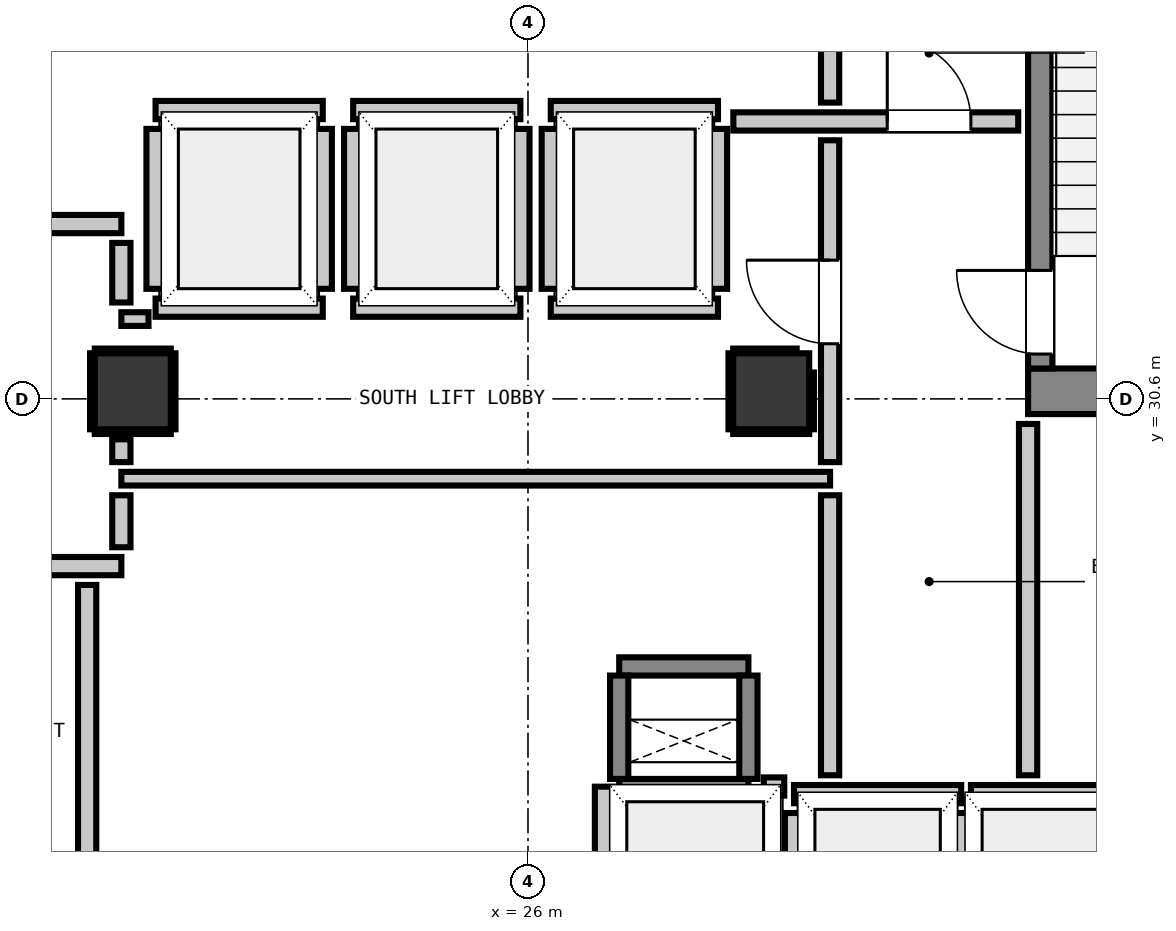
"""IFC4 building model, lengths in metres.
Left out: names, types, materials, properties, quantities, classifications, styles, units other than length and angle.
Written with IfcOpenShell. Run it as: python <this file> out.ifc"""

import sys

from ifc_helpers import new_model, si_unit, direction, frame, frame_2d, origin, origin_2d, place, context, subcontext, project, spatial, rectangle, extrude, element, fill, save


model = new_model("IFC4")
c1 = context("Model", 3, precision=1e-05, world=origin(), true_north=direction((0.0, 1.0)))
c2 = subcontext(c1, "Body", "Model", "MODEL_VIEW")
j1 = project(units=[si_unit("LENGTHUNIT", "METRE"), si_unit("PLANEANGLEUNIT", "RADIAN")], contexts=[c1])
p1 = place(None, origin())
s1 = spatial("IfcSite", under=j1, at=p1, CompositionType="ELEMENT")
p2 = place(p1, origin())
s2 = spatial("IfcBuilding", under=s1, at=p2, CompositionType="ELEMENT")
p3 = place(p2, frame((0.0, 0.0, 169.16)))
s3 = spatial("IfcBuildingStorey", under=s2, at=p3, CompositionType="ELEMENT", Elevation=169.16)
p4 = place(p3, frame((32.58, 30.7, 0.0), z_axis=(0.0, 0.0, 1.0), x_axis=(1.0, 0.0, 0.0)))
e1 = element("IfcWall", 1, at=p4, inside=s3, PredefinedType="SHEAR", context=c2, shape_type="SweptSolid", body=[
    extrude(rectangle(XDim=3.415, YDim=0.6, at=frame_2d((1.708, 0.0))), origin(), (0.0, 0.0, 1.0), 3.32),
])
p5 = place(p3, frame((32.74, 31.0, 0.0), z_axis=(0.0, 0.0, 1.0), x_axis=(0.0, 1.0, 0.0)))
e2 = element("IfcWall", 2, at=p5, inside=s3, PredefinedType="SHEAR", context=c2, shape_type="SweptSolid", body=[
    extrude(rectangle(XDim=7.8, YDim=0.32, at=frame_2d((3.9, 0.0))), origin(), (0.0, 0.0, 1.0), 3.32),
])
p6 = place(p5, frame((0.19, 0.0, 0.0)))
e3 = element("IfcOpeningElement", 3, at=p6, cuts=e2, PredefinedType="OPENING", context=c2, shape_type="SweptSolid", body=[
    extrude(rectangle(XDim=1.1, YDim=2.15, at=frame_2d((0.55, 1.075))), frame((0.0, 0.17, 0.0), z_axis=(0.0, -1.0, 0.0), x_axis=(1.0, 0.0, 0.0)), (0.0, 0.0, 1.0), 0.34),
])
for number, where, z_axis, x_axis in (
    (4, (27.2, 25.48, 0.0), (0.0, 0.0, 1.0), (1.0, 0.0, 0.0)),
    (5, (27.2, 27.08, 0.0), (0.0, 0.0, 1.0), (1.0, 0.0, 0.0)),
):
    element("IfcWall", number, at=place(p3, frame(where, z_axis=z_axis, x_axis=x_axis)), inside=s3, PredefinedType="SHEAR", context=c2, shape_type="SweptSolid", body=[
        extrude(rectangle(XDim=1.7, YDim=0.24, at=frame_2d((0.85, 0.0))), origin(), (0.0, 0.0, 1.0), 3.32),
    ])
for number, where, z_axis, x_axis in (
    (6, (27.2, 25.6, 0.0), (0.0, 0.0, 1.0), (0.0, 1.0, 0.0)),
    (7, (28.9, 25.6, 0.0), (0.0, 0.0, 1.0), (0.0, 1.0, 0.0)),
):
    element("IfcWall", number, at=place(p3, frame(where, z_axis=z_axis, x_axis=x_axis)), inside=s3, PredefinedType="SHEAR", context=c2, shape_type="SweptSolid", body=[
        extrude(rectangle(XDim=1.36, YDim=0.24, at=frame_2d((0.68, 0.0))), origin(), (0.0, 0.0, 1.0), 3.32),
    ])
for number, where, z_axis, x_axis in (
    (8, (20.8, 30.7, 0.0), (0.0, 0.0, 1.0), (1.0, 0.0, 0.0)),
    (9, (29.2, 30.7, 0.0), (0.0, 0.0, 1.0), (1.0, 0.0, 0.0)),
):
    element("IfcColumn", number, at=place(p3, frame(where, z_axis=z_axis, x_axis=x_axis)), inside=s3, PredefinedType="COLUMN", context=c2, shape_type="SweptSolid", body=[
        extrude(rectangle(XDim=1.0, YDim=1.0, at=origin_2d()), origin(), (0.0, 0.0, 1.0), 3.32),
    ])
for number, where, z_axis, x_axis in (
    (10, (21.1, 31.8, 0.0), (0.0, 0.0, 1.0), (1.0, 0.0, 0.0)),
    (11, (21.1, 34.4, 0.0), (0.0, 0.0, 1.0), (1.0, 0.0, 0.0)),
):
    element("IfcWall", number, at=place(p3, frame(where, z_axis=z_axis, x_axis=x_axis)), inside=s3, PredefinedType="PARTITIONING", context=c2, shape_type="SweptSolid", body=[
        extrude(rectangle(XDim=2.2, YDim=0.24, at=frame_2d((1.1, 0.0))), origin(), (0.0, 0.0, 1.0), 2.96),
    ])
p7 = place(p3, frame((21.1, 32.048, 0.0), z_axis=(0.0, 0.0, 1.0), x_axis=(0.0, 1.0, 0.0)))
e12 = element("IfcWall", 12, at=p7, inside=s3, PredefinedType="PARTITIONING", context=c2, shape_type="SweptSolid", body=[
    extrude(rectangle(XDim=2.104, YDim=0.24, at=frame_2d((1.052, 0.0))), origin(), (0.0, 0.0, 1.0), 2.195),
])
p8 = place(p3, frame((23.3, 32.048, 0.0), z_axis=(0.0, 0.0, 1.0), x_axis=(0.0, 1.0, 0.0)))
e13 = element("IfcWall", 13, at=p8, inside=s3, PredefinedType="PARTITIONING", context=c2, shape_type="SweptSolid", body=[
    extrude(rectangle(XDim=2.104, YDim=0.24, at=frame_2d((1.052, 0.0))), origin(), (0.0, 0.0, 1.0), 2.96),
])
for number, where, z_axis, x_axis in (
    (14, (23.7, 31.8, 0.0), (0.0, 0.0, 1.0), (1.0, 0.0, 0.0)),
    (15, (23.7, 34.4, 0.0), (0.0, 0.0, 1.0), (1.0, 0.0, 0.0)),
):
    element("IfcWall", number, at=place(p3, frame(where, z_axis=z_axis, x_axis=x_axis)), inside=s3, PredefinedType="PARTITIONING", context=c2, shape_type="SweptSolid", body=[
        extrude(rectangle(XDim=2.2, YDim=0.24, at=frame_2d((1.1, 0.0))), origin(), (0.0, 0.0, 1.0), 2.96),
    ])
for number, where, z_axis, x_axis in (
    (16, (23.7, 32.048, 0.0), (0.0, 0.0, 1.0), (0.0, 1.0, 0.0)),
    (17, (25.9, 32.048, 0.0), (0.0, 0.0, 1.0), (0.0, 1.0, 0.0)),
):
    element("IfcWall", number, at=place(p3, frame(where, z_axis=z_axis, x_axis=x_axis)), inside=s3, PredefinedType="PARTITIONING", context=c2, shape_type="SweptSolid", body=[
        extrude(rectangle(XDim=2.104, YDim=0.24, at=frame_2d((1.052, 0.0))), origin(), (0.0, 0.0, 1.0), 2.96),
    ])
for number, where, z_axis, x_axis in (
    (18, (26.3, 31.8, 0.0), (0.0, 0.0, 1.0), (1.0, 0.0, 0.0)),
    (19, (26.3, 34.4, 0.0), (0.0, 0.0, 1.0), (1.0, 0.0, 0.0)),
):
    element("IfcWall", number, at=place(p3, frame(where, z_axis=z_axis, x_axis=x_axis)), inside=s3, PredefinedType="PARTITIONING", context=c2, shape_type="SweptSolid", body=[
        extrude(rectangle(XDim=2.2, YDim=0.24, at=frame_2d((1.1, 0.0))), origin(), (0.0, 0.0, 1.0), 2.96),
    ])
for number, where, z_axis, x_axis in (
    (20, (26.3, 32.048, 0.0), (0.0, 0.0, 1.0), (0.0, 1.0, 0.0)),
    (21, (28.5, 32.048, 0.0), (0.0, 0.0, 1.0), (0.0, 1.0, 0.0)),
):
    element("IfcWall", number, at=place(p3, frame(where, z_axis=z_axis, x_axis=x_axis)), inside=s3, PredefinedType="PARTITIONING", context=c2, shape_type="SweptSolid", body=[
        extrude(rectangle(XDim=2.104, YDim=0.24, at=frame_2d((1.052, 0.0))), origin(), (0.0, 0.0, 1.0), 2.96),
    ])
p9 = place(p3, frame((29.5, 25.4, 0.0), z_axis=(0.0, 0.0, 1.0), x_axis=(1.0, 0.0, 0.0)))
e22 = element("IfcWall", 22, at=p9, inside=s3, PredefinedType="PARTITIONING", context=c2, shape_type="SweptSolid", body=[
    extrude(rectangle(XDim=2.2, YDim=0.24, at=frame_2d((1.1, 0.0))), origin(), (0.0, 0.0, 1.0), 2.96),
])
p10 = place(p3, frame((29.5, 22.632, 0.0), z_axis=(0.0, 0.0, 1.0), x_axis=(0.0, 1.0, 0.0)))
e23 = element("IfcWall", 23, at=p10, inside=s3, PredefinedType="PARTITIONING", context=c2, shape_type="SweptSolid", body=[
    extrude(rectangle(XDim=2.52, YDim=0.24, at=frame_2d((1.26, 0.0))), origin(), (0.0, 0.0, 1.0), 2.195),
])
p11 = place(p3, frame((31.7, 22.63, 0.0), z_axis=(0.0, 0.0, 1.0), x_axis=(0.0, 1.0, 0.0)))
e24 = element("IfcWall", 24, at=p11, inside=s3, PredefinedType="PARTITIONING", context=c2, shape_type="SweptSolid", body=[
    extrude(rectangle(XDim=2.522, YDim=0.24, at=frame_2d((1.261, 0.0))), origin(), (0.0, 0.0, 1.0), 2.96),
])
p12 = place(p3, frame((31.828, 25.4, 0.0), z_axis=(0.0, 0.0, 1.0), x_axis=(1.0, 0.0, 0.0)))
e25 = element("IfcWall", 25, at=p12, inside=s3, PredefinedType="PARTITIONING", context=c2, shape_type="SweptSolid", body=[
    extrude(rectangle(XDim=2.072, YDim=0.24, at=frame_2d((1.036, 0.0))), origin(), (0.0, 0.0, 1.0), 2.96),
])
p13 = place(p3, frame((29.103, 25.5, 0.0), z_axis=(0.0, 0.0, 1.0), x_axis=(1.0, 0.0, 0.0)))
e26 = element("IfcWall", 26, at=p13, inside=s3, PredefinedType="PARTITIONING", context=c2, shape_type="SweptSolid", body=[
    extrude(rectangle(XDim=0.269, YDim=0.24, at=frame_2d((0.135, 0.0))), origin(), (0.0, 0.0, 1.0), 2.96),
])
p14 = place(p3, frame((27.0, 22.63, 0.0), z_axis=(0.0, 0.0, 1.0), x_axis=(0.0, 1.0, 0.0)))
e27 = element("IfcWall", 27, at=p14, inside=s3, PredefinedType="PARTITIONING", context=c2, shape_type="SweptSolid", body=[
    extrude(rectangle(XDim=2.868, YDim=0.24, at=frame_2d((1.434, 0.0))), origin(), (0.0, 0.0, 1.0), 2.96),
])
p15 = place(p3, frame((17.45, 28.4, 0.0), z_axis=(0.0, 0.0, 1.0), x_axis=(1.0, 0.0, 0.0)))
e28 = element("IfcWall", 28, at=p15, inside=s3, PredefinedType="PARTITIONING", context=c2, shape_type="SweptSolid", body=[
    extrude(rectangle(XDim=3.2, YDim=0.24, at=frame_2d((1.6, 0.0))), origin(), (0.0, 0.0, 1.0), 2.96),
])
p16 = place(p15, frame((0.784, 0.0, 0.0)))
e29 = element("IfcOpeningElement", 29, at=p16, cuts=e28, PredefinedType="OPENING", context=c2, shape_type="SweptSolid", body=[
    extrude(rectangle(XDim=1.1, YDim=2.15, at=frame_2d((0.55, 1.075))), frame((0.0, 0.13, 0.0), z_axis=(0.0, -1.0, 0.0), x_axis=(1.0, 0.0, 0.0)), (0.0, 0.0, 1.0), 0.26),
])
p17 = place(p3, frame((17.45, 32.9, 0.0), z_axis=(0.0, 0.0, 1.0), x_axis=(1.0, 0.0, 0.0)))
e30 = element("IfcWall", 30, at=p17, inside=s3, PredefinedType="PARTITIONING", context=c2, shape_type="SweptSolid", body=[
    extrude(rectangle(XDim=3.2, YDim=0.24, at=frame_2d((1.6, 0.0))), origin(), (0.0, 0.0, 1.0), 2.96),
])
p18 = place(p17, frame((0.159, 0.0, 0.0)))
e31 = element("IfcOpeningElement", 31, at=p18, cuts=e30, PredefinedType="OPENING", context=c2, shape_type="SweptSolid", body=[
    extrude(rectangle(XDim=1.1, YDim=2.15, at=frame_2d((0.55, 1.075))), frame((0.0, 0.13, 0.0), z_axis=(0.0, -1.0, 0.0), x_axis=(1.0, 0.0, 0.0)), (0.0, 0.0, 1.0), 0.26),
])
p19 = place(p3, frame((28.702, 34.25, 0.0), z_axis=(0.0, 0.0, 1.0), x_axis=(1.0, 0.0, 0.0)))
e32 = element("IfcWall", 32, at=p19, inside=s3, PredefinedType="PARTITIONING", context=c2, shape_type="SweptSolid", body=[
    extrude(rectangle(XDim=3.748, YDim=0.24, at=frame_2d((1.874, 0.0))), origin(), (0.0, 0.0, 1.0), 2.96),
])
p20 = place(p19, frame((2.025, 0.0, 0.0)))
e33 = element("IfcOpeningElement", 33, at=p20, cuts=e32, PredefinedType="OPENING", context=c2, shape_type="SweptSolid", body=[
    extrude(rectangle(XDim=1.1, YDim=2.15, at=frame_2d((0.55, 1.075))), frame((0.0, 0.13, 0.0), z_axis=(0.0, -1.0, 0.0), x_axis=(1.0, 0.0, 0.0)), (0.0, 0.0, 1.0), 0.26),
])
p21 = place(p3, frame((20.65, 29.55, 0.0), z_axis=(0.0, 0.0, 1.0), x_axis=(1.0, 0.0, 0.0)))
e34 = element("IfcWall", 34, at=p21, inside=s3, PredefinedType="PARTITIONING", context=c2, shape_type="SweptSolid", body=[
    extrude(rectangle(XDim=9.325, YDim=0.18, at=frame_2d((4.663, 0.0))), origin(), (0.0, 0.0, 1.0), 2.96),
])
p22 = place(p3, frame((20.65, 31.65, 0.0), z_axis=(0.0, 0.0, 1.0), x_axis=(1.0, 0.0, 0.0)))
e35 = element("IfcWall", 35, at=p22, inside=s3, PredefinedType="PARTITIONING", context=c2, shape_type="SweptSolid", body=[
    extrude(rectangle(XDim=0.357, YDim=0.18, at=frame_2d((0.179, 0.0))), origin(), (0.0, 0.0, 1.0), 2.96),
])
p23 = place(p3, frame((20.2, 22.586, 0.0), z_axis=(0.0, 0.0, 1.0), x_axis=(0.0, 1.0, 0.0)))
e36 = element("IfcWall", 36, at=p23, inside=s3, PredefinedType="PARTITIONING", context=c2, shape_type="SweptSolid", body=[
    extrude(rectangle(XDim=5.566, YDim=0.24, at=frame_2d((2.783, 0.0))), origin(), (0.0, 0.0, 1.0), 2.96),
])
p24 = place(p3, frame((20.65, 28.648, 0.0), z_axis=(0.0, 0.0, 1.0), x_axis=(0.0, 1.0, 0.0)))
e37 = element("IfcWall", 37, at=p24, inside=s3, PredefinedType="PARTITIONING", context=c2, shape_type="SweptSolid", body=[
    extrude(rectangle(XDim=0.684, YDim=0.24, at=frame_2d((0.342, 0.0))), origin(), (0.0, 0.0, 1.0), 2.195),
])
p25 = place(p3, frame((20.65, 29.768, 0.0), z_axis=(0.0, 0.0, 1.0), x_axis=(0.0, 1.0, 0.0)))
e38 = element("IfcWall", 38, at=p25, inside=s3, PredefinedType="PARTITIONING", context=c2, shape_type="SweptSolid", body=[
    extrude(rectangle(XDim=0.3, YDim=0.24, at=frame_2d((0.15, 0.0))), origin(), (0.0, 0.0, 1.0), 2.195),
])
p26 = place(p3, frame((20.65, 31.868, 0.0), z_axis=(0.0, 0.0, 1.0), x_axis=(0.0, 1.0, 0.0)))
e39 = element("IfcWall", 39, at=p26, inside=s3, PredefinedType="PARTITIONING", context=c2, shape_type="SweptSolid", body=[
    extrude(rectangle(XDim=0.784, YDim=0.24, at=frame_2d((0.392, 0.0))), origin(), (0.0, 0.0, 1.0), 2.195),
])
p27 = place(p3, frame((29.975, 25.648, 0.0), z_axis=(0.0, 0.0, 1.0), x_axis=(0.0, 1.0, 0.0)))
e40 = element("IfcWall", 40, at=p27, inside=s3, PredefinedType="PARTITIONING", context=c2, shape_type="SweptSolid", body=[
    extrude(rectangle(XDim=3.684, YDim=0.24, at=frame_2d((1.842, 0.0))), origin(), (0.0, 0.0, 1.0), 2.96),
])
p28 = place(p3, frame((29.975, 29.768, 0.0), z_axis=(0.0, 0.0, 1.0), x_axis=(0.0, 1.0, 0.0)))
e41 = element("IfcWall", 41, at=p28, inside=s3, PredefinedType="PARTITIONING", context=c2, shape_type="SweptSolid", body=[
    extrude(rectangle(XDim=4.234, YDim=0.24, at=frame_2d((2.117, 0.0))), origin(), (0.0, 0.0, 1.0), 2.96),
])
p29 = place(p28, frame((1.557, 0.0, 0.0)))
e42 = element("IfcOpeningElement", 42, at=p29, cuts=e41, PredefinedType="OPENING", context=c2, shape_type="SweptSolid", body=[
    extrude(rectangle(XDim=1.1, YDim=2.15, at=frame_2d((0.55, 1.075))), frame((0.0, 0.13, 0.0), z_axis=(0.0, -1.0, 0.0), x_axis=(1.0, 0.0, 0.0)), (0.0, 0.0, 1.0), 0.26),
])
p30 = place(p3, frame((29.975, 34.498, 0.0), z_axis=(0.0, 0.0, 1.0), x_axis=(0.0, 1.0, 0.0)))
e43 = element("IfcWall", 43, at=p30, inside=s3, PredefinedType="PARTITIONING", context=c2, shape_type="SweptSolid", body=[
    extrude(rectangle(XDim=0.964, YDim=0.24, at=frame_2d((0.482, 0.0))), origin(), (0.0, 0.0, 1.0), 2.96),
])
p31 = place(p3, frame((32.58, 25.648, 0.0), z_axis=(0.0, 0.0, 1.0), x_axis=(0.0, 1.0, 0.0)))
e44 = element("IfcWall", 44, at=p31, inside=s3, PredefinedType="PARTITIONING", context=c2, shape_type="SweptSolid", body=[
    extrude(rectangle(XDim=4.622, YDim=0.24, at=frame_2d((2.311, 0.0))), origin(), (0.0, 0.0, 1.0), 2.96),
])
for number, where, z_axis, x_axis in (
    (45, (20.3, 30.168, 0.0), (0.0, 0.0, 1.0), (1.0, 0.0, 0.0)),
    (46, (20.3, 31.232, 0.0), (0.0, 0.0, 1.0), (1.0, 0.0, 0.0)),
    (47, (20.268, 30.2, 0.0), (0.0, 0.0, 1.0), (0.0, 1.0, 0.0)),
    (48, (21.332, 30.2, 0.0), (0.0, 0.0, 1.0), (0.0, 1.0, 0.0)),
    (49, (28.7, 30.168, 0.0), (0.0, 0.0, 1.0), (1.0, 0.0, 0.0)),
):
    element("IfcWall", number, at=place(p3, frame(where, z_axis=z_axis, x_axis=x_axis)), inside=s3, PredefinedType="PARTITIONING", context=c2, shape_type="SweptSolid", body=[
        extrude(rectangle(XDim=1.0, YDim=0.06, at=frame_2d((0.5, 0.0))), origin(), (0.0, 0.0, 1.0), 1.45),
    ])
p32 = place(p3, frame((28.7, 31.232, 0.0), z_axis=(0.0, 0.0, 1.0), x_axis=(1.0, 0.0, 0.0)))
e50 = element("IfcWall", 50, at=p32, inside=s3, PredefinedType="PARTITIONING", context=c2, shape_type="SweptSolid", body=[
    extrude(rectangle(XDim=0.835, YDim=0.06, at=frame_2d((0.417, 0.0))), origin(), (0.0, 0.0, 1.0), 1.45),
])
p33 = place(p3, frame((28.668, 30.2, 0.0), z_axis=(0.0, 0.0, 1.0), x_axis=(0.0, 1.0, 0.0)))
e51 = element("IfcWall", 51, at=p33, inside=s3, PredefinedType="PARTITIONING", context=c2, shape_type="SweptSolid", body=[
    extrude(rectangle(XDim=1.0, YDim=0.06, at=frame_2d((0.5, 0.0))), origin(), (0.0, 0.0, 1.0), 1.45),
])
p34 = place(p3, frame((29.732, 30.2, 0.0), z_axis=(0.0, 0.0, 1.0), x_axis=(0.0, 1.0, 0.0)))
e52 = element("IfcWall", 52, at=p34, inside=s3, PredefinedType="PARTITIONING", context=c2, shape_type="SweptSolid", body=[
    extrude(rectangle(XDim=0.747, YDim=0.06, at=frame_2d((0.374, 0.0))), origin(), (0.0, 0.0, 1.0), 1.45),
])
p35 = place(p6, origin())
e53 = element("IfcDoor", 53, at=p35, inside=s3, OperationType="SINGLE_SWING_RIGHT", PredefinedType="DOOR", context=c2, shape_type="SweptSolid", body=[
    extrude(rectangle(XDim=1.1, YDim=2.15, at=frame_2d((0.55, 1.075))), frame((0.0, 0.025, 0.0), z_axis=(0.0, -1.0, 0.0), x_axis=(1.0, 0.0, 0.0)), (0.0, 0.0, 1.0), 0.05),
])
fill(e3, e53)
p36 = place(p29, origin())
e54 = element("IfcDoor", 54, at=p36, inside=s3, OperationType="SINGLE_SWING_RIGHT", PredefinedType="DOOR", context=c2, shape_type="SweptSolid", body=[
    extrude(rectangle(XDim=1.1, YDim=2.15, at=frame_2d((0.55, 1.075))), frame((0.0, 0.025, 0.0), z_axis=(0.0, -1.0, 0.0), x_axis=(1.0, 0.0, 0.0)), (0.0, 0.0, 1.0), 0.05),
])
fill(e42, e54)
p37 = place(p20, origin())
e55 = element("IfcDoor", 55, at=p37, inside=s3, OperationType="SINGLE_SWING_LEFT", PredefinedType="DOOR", context=c2, shape_type="SweptSolid", body=[
    extrude(rectangle(XDim=1.1, YDim=2.15, at=frame_2d((0.55, 1.075))), frame((0.0, 0.025, 0.0), z_axis=(0.0, -1.0, 0.0), x_axis=(1.0, 0.0, 0.0)), (0.0, 0.0, 1.0), 0.05),
])
fill(e33, e55)
save(model, sys.argv[1])
